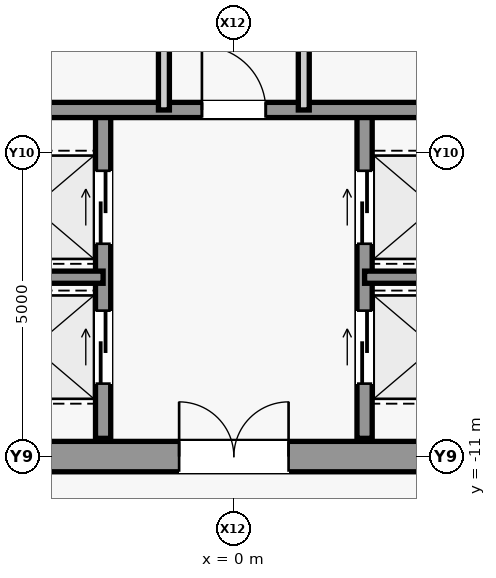
"""IFC4 building model, lengths in metres.
Left out: names, types, materials, properties, quantities, classifications, styles, units other than length and angle.
Written with IfcOpenShell. Run it as: python <this file> out.ifc"""

import sys

from ifc_helpers import new_model, si_unit, direction, frame, frame_2d, origin, place, context, subcontext, project, spatial, rectangle, extrude, source, transform, mapped, element, fill, save


model = new_model("IFC4")
c1 = context("Model", 3, precision=1e-05, world=origin(), true_north=direction((0.0, 1.0)))
c2 = subcontext(c1, "Body", "Model", "MODEL_VIEW")
j1 = project(units=[si_unit("LENGTHUNIT", "METRE"), si_unit("PLANEANGLEUNIT", "RADIAN")], contexts=[c1])
p1 = place(None, origin())
s1 = spatial("IfcSite", under=j1, at=p1, CompositionType="ELEMENT")
p2 = place(p1, origin())
s2 = spatial("IfcBuilding", under=s1, at=p2, CompositionType="ELEMENT")
p3 = place(p2, frame((0.0, 0.0, 83.0)))
s3 = spatial("IfcBuildingStorey", under=s2, at=p3, CompositionType="ELEMENT", Elevation=83.0)
m1 = source(origin(), c2, "Body", "SweptSolid", [
    extrude(rectangle(XDim=9.2, YDim=0.5, at=frame_2d((4.6, 0.0))), origin(), (0.0, 0.0, 1.0), 3.94),
])
p4 = place(p3, frame((-4.6, -11.0, 0.0), z_axis=(0.0, 0.0, 1.0), x_axis=(1.0, 0.0, 0.0)))
e1 = element("IfcWall", 1, at=p4, inside=s3, PredefinedType="SHEAR", context=c2, shape_type="MappedRepresentation", body=[
    mapped(m1, transform((0.0, 0.0, 0.0), scale=1.0)),
])
m2 = source(origin(), c2, "Body", "SweptSolid", [
    extrude(rectangle(XDim=1.8, YDim=2.25, at=frame_2d((0.9, 1.125))), frame((0.0, 0.26, 0.0), z_axis=(0.0, -1.0, 0.0), x_axis=(1.0, 0.0, 0.0)), (0.0, 0.0, 1.0), 0.52),
])
p5 = place(p4, frame((3.7, 0.0, 0.0)))
e2 = element("IfcOpeningElement", 2, at=p5, cuts=e1, PredefinedType="OPENING", context=c2, shape_type="MappedRepresentation", body=[
    mapped(m2, transform((0.0, 0.0, 0.0), scale=1.0)),
])
m3 = source(origin(), c2, "Body", "SweptSolid", [
    extrude(rectangle(XDim=5.4, YDim=0.25, at=frame_2d((2.7, 0.0))), origin(), (0.0, 0.0, 1.0), 3.94),
])
p6 = place(p3, frame((-2.15, -10.7, 0.0), z_axis=(0.0, 0.0, 1.0), x_axis=(0.0, 1.0, 0.0)))
e3 = element("IfcWall", 3, at=p6, inside=s3, PredefinedType="SHEAR", context=c2, shape_type="MappedRepresentation", body=[
    mapped(m3, transform((0.0, 0.0, 0.0), scale=1.0)),
])
m4 = source(origin(), c2, "Body", "SweptSolid", [
    extrude(rectangle(XDim=1.2, YDim=2.3, at=frame_2d((0.6, 1.15))), frame((0.0, 0.135, 0.0), z_axis=(0.0, -1.0, 0.0), x_axis=(1.0, 0.0, 0.0)), (0.0, 0.0, 1.0), 0.27),
])
p7 = place(p6, frame((0.9, 0.0, 0.0)))
e4 = element("IfcOpeningElement", 4, at=p7, cuts=e3, PredefinedType="OPENING", context=c2, shape_type="MappedRepresentation", body=[
    mapped(m4, transform((0.0, 0.0, 0.0), scale=1.0)),
])
p8 = place(p6, frame((3.2, 0.0, 0.0)))
e5 = element("IfcOpeningElement", 5, at=p8, cuts=e3, PredefinedType="OPENING", context=c2, shape_type="MappedRepresentation", body=[
    mapped(m4, transform((0.0, 0.0, 0.0), scale=1.0)),
])
p9 = place(p3, frame((2.15, -10.7, 0.0), z_axis=(0.0, 0.0, 1.0), x_axis=(0.0, 1.0, 0.0)))
e6 = element("IfcWall", 6, at=p9, inside=s3, PredefinedType="SHEAR", context=c2, shape_type="MappedRepresentation", body=[
    mapped(m3, transform((0.0, 0.0, 0.0), scale=1.0)),
])
p10 = place(p9, frame((0.9, 0.0, 0.0)))
e7 = element("IfcOpeningElement", 7, at=p10, cuts=e6, PredefinedType="OPENING", context=c2, shape_type="MappedRepresentation", body=[
    mapped(m4, transform((0.0, 0.0, 0.0), scale=1.0)),
])
p11 = place(p9, frame((3.2, 0.0, 0.0)))
e8 = element("IfcOpeningElement", 8, at=p11, cuts=e6, PredefinedType="OPENING", context=c2, shape_type="MappedRepresentation", body=[
    mapped(m4, transform((0.0, 0.0, 0.0), scale=1.0)),
])
m5 = source(origin(), c2, "Body", "SweptSolid", [
    extrude(rectangle(XDim=2.45, YDim=0.2, at=frame_2d((1.225, 0.0))), origin(), (0.0, 0.0, 1.0), 3.94),
])
for number, where, z_axis, x_axis in (
    (9, (-4.6, -8.05, 0.0), (0.0, 0.0, 1.0), (1.0, 0.0, 0.0)),
    (10, (2.15, -8.05, 0.0), (0.0, 0.0, 1.0), (1.0, 0.0, 0.0)),
):
    element("IfcWall", number, at=place(p3, frame(where, z_axis=z_axis, x_axis=x_axis)), inside=s3, PredefinedType="SHEAR", context=c2, shape_type="MappedRepresentation", body=[
        mapped(m5, transform((0.0, 0.0, 0.0), scale=1.0)),
    ])
m6 = source(origin(), c2, "Body", "SweptSolid", [
    extrude(rectangle(XDim=9.2, YDim=0.25, at=frame_2d((4.6, 0.0))), origin(), (0.0, 0.0, 1.0), 3.94),
])
p12 = place(p3, frame((-4.6, -5.3, 0.0), z_axis=(0.0, 0.0, 1.0), x_axis=(1.0, 0.0, 0.0)))
e11 = element("IfcWall", 11, at=p12, inside=s3, PredefinedType="SHEAR", context=c2, shape_type="MappedRepresentation", body=[
    mapped(m6, transform((0.0, 0.0, 0.0), scale=1.0)),
])
m7 = source(origin(), c2, "Body", "SweptSolid", [
    extrude(rectangle(XDim=1.05, YDim=2.2, at=frame_2d((0.525, 1.1))), frame((0.0, 0.135, 0.0), z_axis=(0.0, -1.0, 0.0), x_axis=(1.0, 0.0, 0.0)), (0.0, 0.0, 1.0), 0.27),
])
p13 = place(p12, frame((4.075, 0.0, 0.0)))
e12 = element("IfcOpeningElement", 12, at=p13, cuts=e11, PredefinedType="OPENING", context=c2, shape_type="MappedRepresentation", body=[
    mapped(m7, transform((0.0, 0.0, 0.0), scale=1.0)),
])
m8 = source(origin(), c2, "Body", "SweptSolid", [
    extrude(rectangle(XDim=10.6, YDim=0.18, at=frame_2d((5.3, 0.0))), origin(), (0.0, 0.0, 1.0), 3.94),
])
p14 = place(p3, frame((-1.15, -5.3, 0.0), z_axis=(0.0, 0.0, 1.0), x_axis=(0.0, 1.0, 0.0)))
e13 = element("IfcWall", 13, at=p14, inside=s3, PredefinedType="PARTITIONING", context=c2, shape_type="MappedRepresentation", body=[
    mapped(m8, transform((0.0, 0.0, 0.0), scale=1.0)),
])
m9 = source(origin(), c2, "Body", "SweptSolid", [
    extrude(rectangle(XDim=0.9, YDim=2.15, at=frame_2d((0.45, 1.075))), frame((0.0, 0.1, 0.0), z_axis=(0.0, -1.0, 0.0), x_axis=(1.0, 0.0, 0.0)), (0.0, 0.0, 1.0), 0.2),
])
p15 = place(p14, frame((1.3, 0.0, 0.0)))
e14 = element("IfcOpeningElement", 14, at=p15, cuts=e13, PredefinedType="OPENING", context=c2, shape_type="MappedRepresentation", body=[
    mapped(m9, transform((0.0, 0.0, 0.0), scale=1.0)),
])
p16 = place(p14, frame((4.9, 0.0, 0.0)))
e15 = element("IfcOpeningElement", 15, at=p16, cuts=e13, PredefinedType="OPENING", context=c2, shape_type="MappedRepresentation", body=[
    mapped(m9, transform((0.0, 0.0, 0.0), scale=1.0)),
])
p17 = place(p14, frame((7.8, 0.0, 0.0)))
e16 = element("IfcOpeningElement", 16, at=p17, cuts=e13, PredefinedType="OPENING", context=c2, shape_type="MappedRepresentation", body=[
    mapped(m9, transform((0.0, 0.0, 0.0), scale=1.0)),
])
p18 = place(p14, frame((9.475, 0.0, 0.0)))
e17 = element("IfcOpeningElement", 17, at=p18, cuts=e13, PredefinedType="OPENING", context=c2, shape_type="MappedRepresentation", body=[
    mapped(m9, transform((0.0, 0.0, 0.0), scale=1.0)),
])
p19 = place(p3, frame((1.15, -5.3, 0.0), z_axis=(0.0, 0.0, 1.0), x_axis=(0.0, 1.0, 0.0)))
e18 = element("IfcWall", 18, at=p19, inside=s3, PredefinedType="PARTITIONING", context=c2, shape_type="MappedRepresentation", body=[
    mapped(m8, transform((0.0, 0.0, 0.0), scale=1.0)),
])
p20 = place(p19, frame((4.2, 0.0, 0.0)))
e19 = element("IfcOpeningElement", 19, at=p20, cuts=e18, PredefinedType="OPENING", context=c2, shape_type="MappedRepresentation", body=[
    mapped(m9, transform((0.0, 0.0, 0.0), scale=1.0)),
])
p21 = place(p19, frame((9.475, 0.0, 0.0)))
e20 = element("IfcOpeningElement", 20, at=p21, cuts=e18, PredefinedType="OPENING", context=c2, shape_type="MappedRepresentation", body=[
    mapped(m9, transform((0.0, 0.0, 0.0), scale=1.0)),
])
m10 = source(origin(), c2, "Body", "SweptSolid", [
    extrude(rectangle(XDim=1.05, YDim=2.2, at=frame_2d((0.525, 1.1))), frame((0.0, 0.025, 0.0), z_axis=(0.0, -1.0, 0.0), x_axis=(1.0, 0.0, 0.0)), (0.0, 0.0, 1.0), 0.05),
])
p22 = place(p13, origin())
e21 = element("IfcDoor", 21, at=p22, inside=s3, OperationType="SINGLE_SWING_LEFT", PredefinedType="DOOR", context=c2, shape_type="MappedRepresentation", body=[
    mapped(m10, transform((0.0, 0.0, 0.0), scale=1.0)),
])
fill(e12, e21)
m11 = source(origin(), c2, "Body", "SweptSolid", [
    extrude(rectangle(XDim=1.8, YDim=2.25, at=frame_2d((0.9, 1.125))), frame((0.0, 0.025, 0.0), z_axis=(0.0, -1.0, 0.0), x_axis=(1.0, 0.0, 0.0)), (0.0, 0.0, 1.0), 0.05),
])
p23 = place(p5, origin())
e22 = element("IfcDoor", 22, at=p23, inside=s3, OperationType="SINGLE_SWING_LEFT", PredefinedType="DOOR", context=c2, shape_type="MappedRepresentation", body=[
    mapped(m11, transform((0.0, 0.0, 0.0), scale=1.0)),
])
fill(e2, e22)
m12 = source(origin(), c2, "Body", "SweptSolid", [
    extrude(rectangle(XDim=1.2, YDim=2.3, at=frame_2d((0.6, 1.15))), frame((0.0, 0.025, 0.0), z_axis=(0.0, -1.0, 0.0), x_axis=(1.0, 0.0, 0.0)), (0.0, 0.0, 1.0), 0.05),
])
p24 = place(p7, origin())
e23 = element("IfcDoor", 23, at=p24, inside=s3, OperationType="SLIDING_TO_LEFT", PredefinedType="DOOR", context=c2, shape_type="MappedRepresentation", body=[
    mapped(m12, transform((0.0, 0.0, 0.0), scale=1.0)),
])
fill(e4, e23)
p25 = place(p10, origin())
e24 = element("IfcDoor", 24, at=p25, inside=s3, OperationType="SLIDING_TO_LEFT", PredefinedType="DOOR", context=c2, shape_type="MappedRepresentation", body=[
    mapped(m12, transform((0.0, 0.0, 0.0), scale=1.0)),
])
fill(e7, e24)
p26 = place(p8, origin())
e25 = element("IfcDoor", 25, at=p26, inside=s3, OperationType="SLIDING_TO_LEFT", PredefinedType="DOOR", context=c2, shape_type="MappedRepresentation", body=[
    mapped(m12, transform((0.0, 0.0, 0.0), scale=1.0)),
])
fill(e5, e25)
p27 = place(p11, origin())
e26 = element("IfcDoor", 26, at=p27, inside=s3, OperationType="SLIDING_TO_LEFT", PredefinedType="DOOR", context=c2, shape_type="MappedRepresentation", body=[
    mapped(m12, transform((0.0, 0.0, 0.0), scale=1.0)),
])
fill(e8, e26)
save(model, sys.argv[1])
